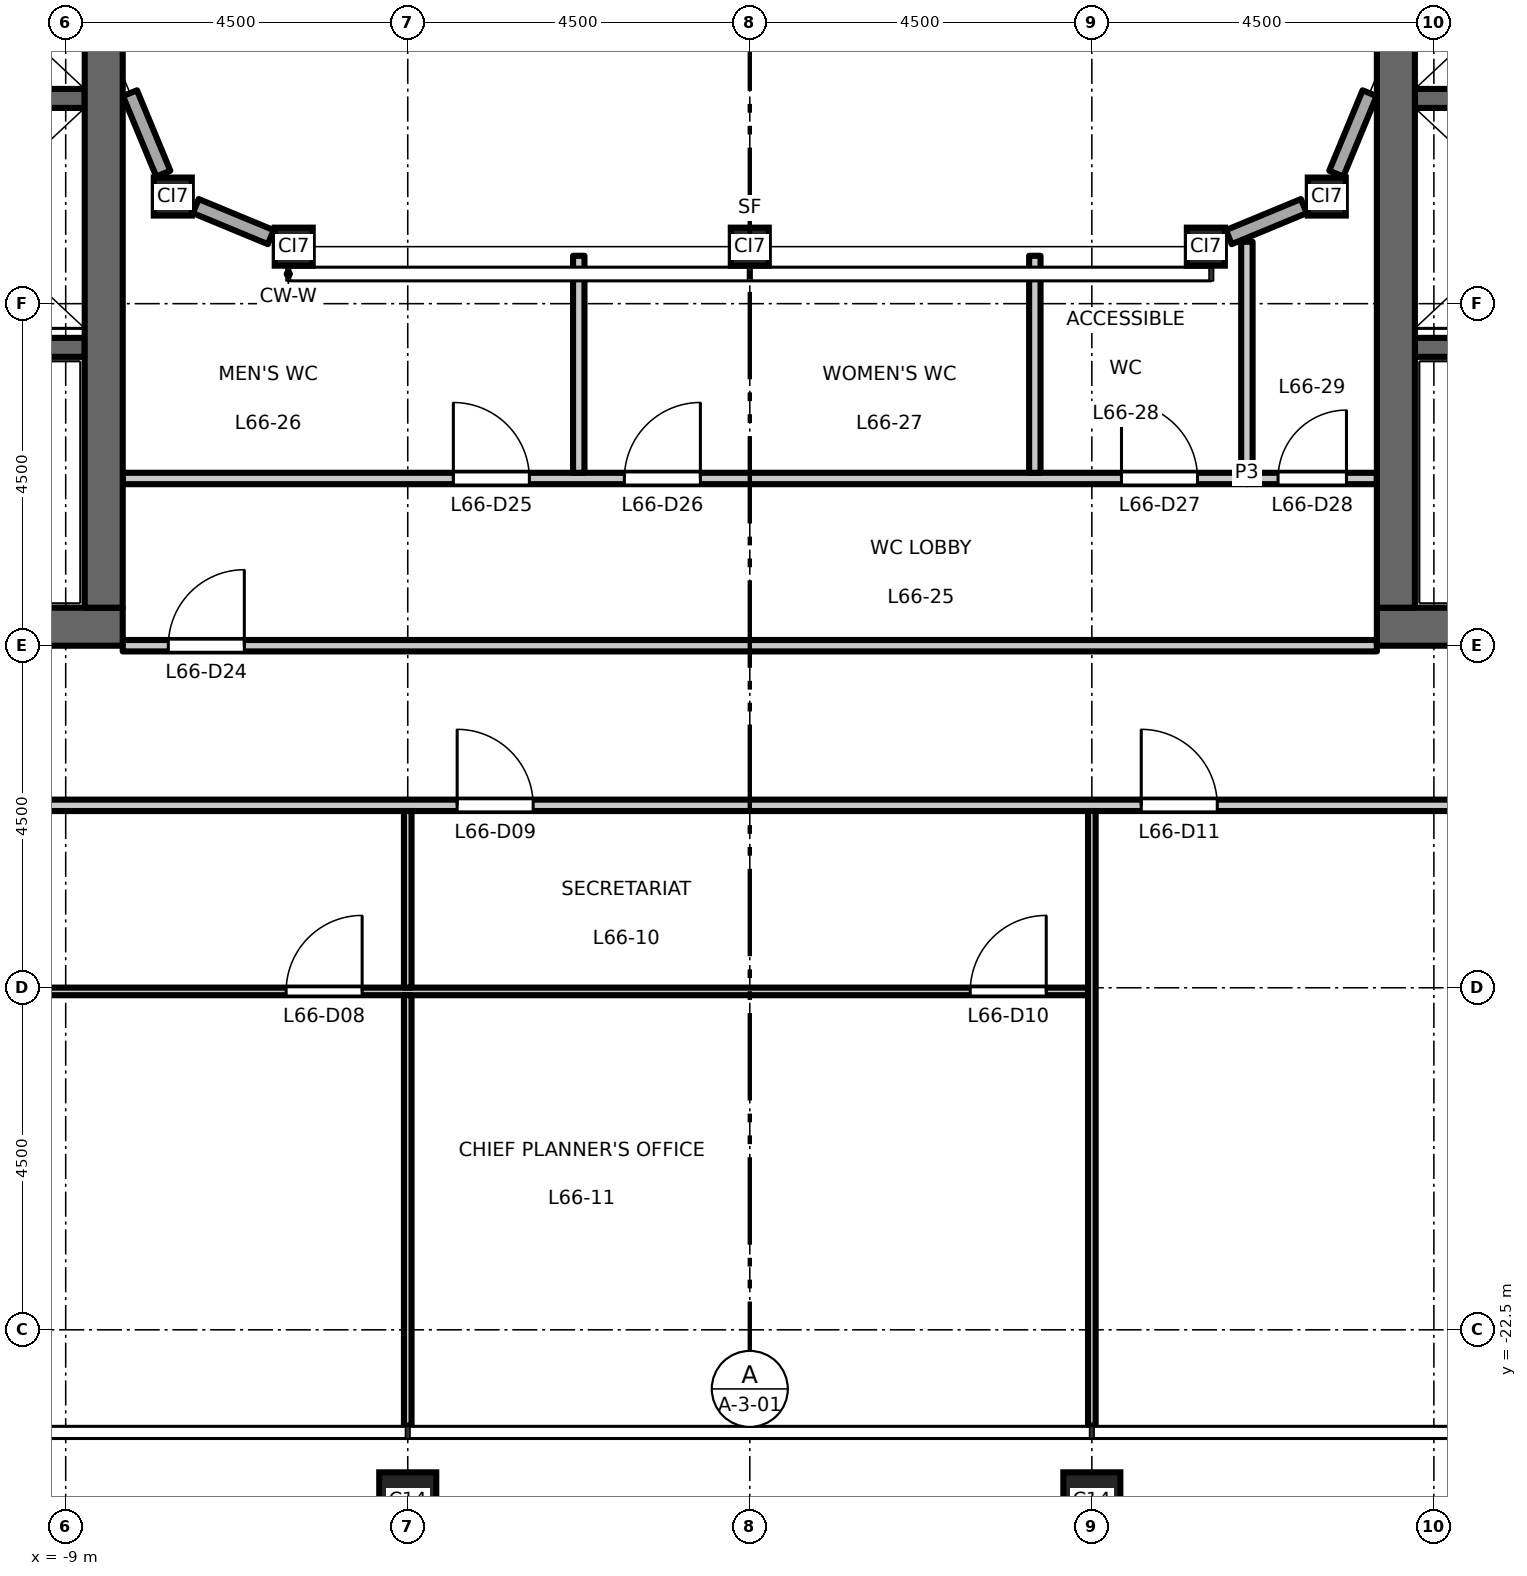
"""IFC4 building model, lengths in metres.
Left out: names, types, materials, properties, quantities, classifications, styles, units other than length and angle.
Written with IfcOpenShell. Run it as: python <this file> out.ifc"""

import sys

from ifc_helpers import new_model, si_unit, direction, frame, frame_2d, origin, origin_2d, place, context, subcontext, project, spatial, rectangle, hollow_rectangle, extrude, element, fill, save


model = new_model("IFC4")
c1 = context("Model", 3, precision=1e-05, world=origin(), true_north=direction((0.0, 1.0)))
c2 = subcontext(c1, "Body", "Model", "MODEL_VIEW")
j1 = project(units=[si_unit("LENGTHUNIT", "METRE"), si_unit("PLANEANGLEUNIT", "RADIAN")], contexts=[c1])
p1 = place(None, origin())
s1 = spatial("IfcSite", under=j1, at=p1, CompositionType="ELEMENT")
p2 = place(p1, origin())
s2 = spatial("IfcBuilding", under=s1, at=p2, CompositionType="ELEMENT")
p3 = place(p2, frame((0.0, 0.0, 307.7)))
s3 = spatial("IfcBuildingStorey", under=s2, at=p3, CompositionType="ELEMENT", Elevation=307.7)
for number, where, z_axis, x_axis in (
    (1, (-4.5, -24.75, 0.0), (0.0, 0.0, 1.0), (1.0, 0.0, 0.0)),
    (2, (4.5, -24.75, 0.0), (0.0, 0.0, 1.0), (1.0, 0.0, 0.0)),
):
    element("IfcColumn", number, at=place(p3, frame(where, z_axis=z_axis, x_axis=x_axis)), inside=s3, PredefinedType="COLUMN", context=c2, shape_type="SweptSolid", body=[
        extrude(hollow_rectangle(XDim=0.75, YDim=0.75, WallThickness=0.04, at=origin_2d()), origin(), (0.0, 0.0, 1.0), 4.5),
    ])
for number, where, z_axis, x_axis in (
    (3, (-7.591, -7.591, 0.0), (0.0, 0.0, 1.0), (1.0, 0.0, 0.0)),
    (4, (-6.0, -8.25, 0.0), (0.0, 0.0, 1.0), (1.0, 0.0, 0.0)),
    (5, (0.0, -8.25, 0.0), (0.0, 0.0, 1.0), (1.0, 0.0, 0.0)),
    (6, (6.0, -8.25, 0.0), (0.0, 0.0, 1.0), (1.0, 0.0, 0.0)),
    (7, (7.591, -7.591, 0.0), (0.0, 0.0, 1.0), (1.0, 0.0, 0.0)),
):
    element("IfcColumn", number, at=place(p3, frame(where, z_axis=z_axis, x_axis=x_axis)), inside=s3, PredefinedType="COLUMN", context=c2, shape_type="SweptSolid", body=[
        extrude(hollow_rectangle(XDim=0.5, YDim=0.5, WallThickness=0.025, at=origin_2d()), origin(), (0.0, 0.0, 1.0), 4.5),
    ])
p4 = place(p3, frame((-8.75, -6.3, 0.0), z_axis=(0.0, 0.0, 1.0), x_axis=(-1.0, 0.0, 0.0)))
e8 = element("IfcWall", 8, at=p4, inside=s3, PredefinedType="SHEAR", context=c2, shape_type="SweptSolid", body=[
    extrude(rectangle(XDim=3.1, YDim=0.25, at=frame_2d((1.55, 0.0))), origin(), (0.0, 0.0, 1.0), 4.35),
])
p5 = place(p3, frame((-8.75, -9.575, 0.0), z_axis=(0.0, 0.0, 1.0), x_axis=(-1.0, 0.0, 0.0)))
e9 = element("IfcWall", 9, at=p5, inside=s3, PredefinedType="SHEAR", context=c2, shape_type="SweptSolid", body=[
    extrude(rectangle(XDim=8.0, YDim=0.25, at=frame_2d((4.0, 0.0))), origin(), (0.0, 0.0, 1.0), 4.35),
])
p6 = place(p5, frame((6.65, 0.0, 0.0)))
e10 = element("IfcOpeningElement", 10, at=p6, cuts=e9, PredefinedType="OPENING", context=c2, shape_type="SweptSolid", body=[
    extrude(rectangle(XDim=1.1, YDim=2.1, at=frame_2d((0.55, 1.05))), frame((0.0, 0.135, 0.0), z_axis=(0.0, -1.0, 0.0), x_axis=(1.0, 0.0, 0.0)), (0.0, 0.0, 1.0), 0.27),
])
p7 = place(p3, frame((-8.25, -13.25, 0.0), z_axis=(0.0, 0.0, 1.0), x_axis=(-1.0, 0.0, 0.0)))
e11 = element("IfcWall", 11, at=p7, inside=s3, PredefinedType="SHEAR", context=c2, shape_type="SweptSolid", body=[
    extrude(rectangle(XDim=9.0, YDim=0.5, at=frame_2d((4.5, 0.0))), origin(), (0.0, 0.0, 1.0), 4.35),
])
p8 = place(p3, frame((-8.5, -13.0, 0.0), z_axis=(0.0, 0.0, 1.0), x_axis=(0.0, 1.0, 0.0)))
e12 = element("IfcWall", 12, at=p8, inside=s3, PredefinedType="SHEAR", context=c2, shape_type="SweptSolid", body=[
    extrude(rectangle(XDim=26.0, YDim=0.5, at=frame_2d((13.0, 0.0))), origin(), (0.0, 0.0, 1.0), 4.35),
])
p9 = place(p3, frame((8.75, -6.3, 0.0), z_axis=(0.0, 0.0, 1.0), x_axis=(1.0, 0.0, 0.0)))
e13 = element("IfcWall", 13, at=p9, inside=s3, PredefinedType="SHEAR", context=c2, shape_type="SweptSolid", body=[
    extrude(rectangle(XDim=3.1, YDim=0.25, at=frame_2d((1.55, 0.0))), origin(), (0.0, 0.0, 1.0), 4.35),
])
p10 = place(p3, frame((8.75, -9.575, 0.0), z_axis=(0.0, 0.0, 1.0), x_axis=(1.0, 0.0, 0.0)))
e14 = element("IfcWall", 14, at=p10, inside=s3, PredefinedType="SHEAR", context=c2, shape_type="SweptSolid", body=[
    extrude(rectangle(XDim=8.0, YDim=0.25, at=frame_2d((4.0, 0.0))), origin(), (0.0, 0.0, 1.0), 4.35),
])
p11 = place(p10, frame((6.65, 0.0, 0.0)))
e15 = element("IfcOpeningElement", 15, at=p11, cuts=e14, PredefinedType="OPENING", context=c2, shape_type="SweptSolid", body=[
    extrude(rectangle(XDim=1.1, YDim=2.1, at=frame_2d((0.55, 1.05))), frame((0.0, 0.135, 0.0), z_axis=(0.0, -1.0, 0.0), x_axis=(1.0, 0.0, 0.0)), (0.0, 0.0, 1.0), 0.27),
])
p12 = place(p3, frame((8.25, -13.25, 0.0), z_axis=(0.0, 0.0, 1.0), x_axis=(1.0, 0.0, 0.0)))
e16 = element("IfcWall", 16, at=p12, inside=s3, PredefinedType="SHEAR", context=c2, shape_type="SweptSolid", body=[
    extrude(rectangle(XDim=9.0, YDim=0.5, at=frame_2d((4.5, 0.0))), origin(), (0.0, 0.0, 1.0), 4.35),
])
p13 = place(p3, frame((8.5, -13.0, 0.0), z_axis=(0.0, 0.0, 1.0), x_axis=(0.0, 1.0, 0.0)))
e17 = element("IfcWall", 17, at=p13, inside=s3, PredefinedType="SHEAR", context=c2, shape_type="SweptSolid", body=[
    extrude(rectangle(XDim=26.0, YDim=0.5, at=frame_2d((13.0, 0.0))), origin(), (0.0, 0.0, 1.0), 4.35),
])
p14 = place(p3, frame((6.302, -8.125, 0.0), z_axis=(0.0, 0.0, 1.0), x_axis=(0.923919409248, 0.382587147216, 0.0)))
e18 = element("IfcWall", 18, at=p14, inside=s3, PredefinedType="STANDARD", context=c2, shape_type="SweptSolid", body=[
    extrude(rectangle(XDim=1.069, YDim=0.2, at=frame_2d((0.534, 0.0))), origin(), (0.0, 0.0, 1.0), 4.01),
])
for number, where, z_axis, x_axis in (
    (19, (7.716, -7.289, 0.0), (0.0, 0.0, 1.0), (0.383, 0.924, 0.0)),
    (20, (-8.154, -6.231, 0.0), (0.0, 0.0, 1.0), (0.383, -0.924, 0.0)),
):
    element("IfcWall", number, at=place(p3, frame(where, z_axis=z_axis, x_axis=x_axis)), inside=s3, PredefinedType="STANDARD", context=c2, shape_type="SweptSolid", body=[
        extrude(rectangle(XDim=1.146, YDim=0.2, at=frame_2d((0.573, 0.0))), origin(), (0.0, 0.0, 1.0), 4.01),
    ])
p15 = place(p3, frame((-7.289, -7.716, 0.0), z_axis=(0.0, 0.0, 1.0), x_axis=(0.923919409248, -0.382587147216, 0.0)))
e21 = element("IfcWall", 21, at=p15, inside=s3, PredefinedType="STANDARD", context=c2, shape_type="SweptSolid", body=[
    extrude(rectangle(XDim=1.069, YDim=0.2, at=frame_2d((0.534, 0.0))), origin(), (0.0, 0.0, 1.0), 4.01),
])
p16 = place(p3, frame((-13.45, -18.048, 0.0), z_axis=(0.0, 0.0, 1.0), x_axis=(1.0, 0.0, 0.0)))
e22 = element("IfcWall", 22, at=p16, inside=s3, PredefinedType="PARTITIONING", context=c2, shape_type="SweptSolid", body=[
    extrude(rectangle(XDim=17.9, YDim=0.1, at=frame_2d((8.95, 0.0))), origin(), (0.0, 0.0, 1.0), 3.99),
])
p17 = place(p16, frame((7.35, 0.0, 0.0)))
e23 = element("IfcOpeningElement", 23, at=p17, cuts=e22, PredefinedType="OPENING", context=c2, shape_type="SweptSolid", body=[
    extrude(rectangle(XDim=1.0, YDim=2.1, at=frame_2d((0.5, 1.05))), frame((0.0, 0.06, 0.0), z_axis=(0.0, -1.0, 0.0), x_axis=(1.0, 0.0, 0.0)), (0.0, 0.0, 1.0), 0.12),
])
p18 = place(p16, frame((16.35, 0.0, 0.0)))
e24 = element("IfcOpeningElement", 24, at=p18, cuts=e22, PredefinedType="OPENING", context=c2, shape_type="SweptSolid", body=[
    extrude(rectangle(XDim=1.0, YDim=2.1, at=frame_2d((0.5, 1.05))), frame((0.0, 0.06, 0.0), z_axis=(0.0, -1.0, 0.0), x_axis=(1.0, 0.0, 0.0)), (0.0, 0.0, 1.0), 0.12),
])
p19 = place(p3, frame((-19.425, -15.6, 0.0), z_axis=(0.0, 0.0, 1.0), x_axis=(1.0, 0.0, 0.0)))
e25 = element("IfcWall", 25, at=p19, inside=s3, PredefinedType="PARTITIONING", context=c2, shape_type="SweptSolid", body=[
    extrude(rectangle(XDim=38.85, YDim=0.15, at=frame_2d((19.425, 0.0))), origin(), (0.0, 0.0, 1.0), 4.35),
])
p20 = place(p19, frame((6.575, 0.0, 0.0)))
e26 = element("IfcOpeningElement", 26, at=p20, cuts=e25, PredefinedType="OPENING", context=c2, shape_type="SweptSolid", body=[
    extrude(rectangle(XDim=1.0, YDim=2.1, at=frame_2d((0.5, 1.05))), frame((0.0, 0.085, 0.0), z_axis=(0.0, -1.0, 0.0), x_axis=(1.0, 0.0, 0.0)), (0.0, 0.0, 1.0), 0.17),
])
p21 = place(p19, frame((15.575, 0.0, 0.0)))
e27 = element("IfcOpeningElement", 27, at=p21, cuts=e25, PredefinedType="OPENING", context=c2, shape_type="SweptSolid", body=[
    extrude(rectangle(XDim=1.0, YDim=2.1, at=frame_2d((0.5, 1.05))), frame((0.0, 0.085, 0.0), z_axis=(0.0, -1.0, 0.0), x_axis=(1.0, 0.0, 0.0)), (0.0, 0.0, 1.0), 0.17),
])
p22 = place(p19, frame((24.575, 0.0, 0.0)))
e28 = element("IfcOpeningElement", 28, at=p22, cuts=e25, PredefinedType="OPENING", context=c2, shape_type="SweptSolid", body=[
    extrude(rectangle(XDim=1.0, YDim=2.1, at=frame_2d((0.5, 1.05))), frame((0.0, 0.085, 0.0), z_axis=(0.0, -1.0, 0.0), x_axis=(1.0, 0.0, 0.0)), (0.0, 0.0, 1.0), 0.17),
])
p23 = place(p19, frame((0.725, 0.0, 0.0)))
e29 = element("IfcOpeningElement", 29, at=p23, cuts=e25, PredefinedType="OPENING", context=c2, shape_type="SweptSolid", body=[
    extrude(rectangle(XDim=1.0, YDim=2.1, at=frame_2d((0.5, 1.05))), frame((0.0, 0.085, 0.0), z_axis=(0.0, -1.0, 0.0), x_axis=(1.0, 0.0, 0.0)), (0.0, 0.0, 1.0), 0.17),
])
p24 = place(p19, frame((37.075, 0.0, 0.0)))
e30 = element("IfcOpeningElement", 30, at=p24, cuts=e25, PredefinedType="OPENING", context=c2, shape_type="SweptSolid", body=[
    extrude(rectangle(XDim=1.0, YDim=2.1, at=frame_2d((0.5, 1.05))), frame((0.0, 0.085, 0.0), z_axis=(0.0, -1.0, 0.0), x_axis=(1.0, 0.0, 0.0)), (0.0, 0.0, 1.0), 0.17),
])
p25 = place(p3, frame((-8.25, -13.5, 0.0), z_axis=(0.0, 0.0, 1.0), x_axis=(1.0, 0.0, 0.0)))
e31 = element("IfcWall", 31, at=p25, inside=s3, PredefinedType="PARTITIONING", context=c2, shape_type="SweptSolid", body=[
    extrude(rectangle(XDim=16.5, YDim=0.15, at=frame_2d((8.25, 0.0))), origin(), (0.0, 0.0, 1.0), 4.35),
])
p26 = place(p25, frame((0.6, 0.0, 0.0)))
e32 = element("IfcOpeningElement", 32, at=p26, cuts=e31, PredefinedType="OPENING", context=c2, shape_type="SweptSolid", body=[
    extrude(rectangle(XDim=1.0, YDim=2.1, at=frame_2d((0.5, 1.05))), frame((0.0, 0.085, 0.0), z_axis=(0.0, -1.0, 0.0), x_axis=(1.0, 0.0, 0.0)), (0.0, 0.0, 1.0), 0.17),
])
p27 = place(p3, frame((-8.25, -11.3, 0.0), z_axis=(0.0, 0.0, 1.0), x_axis=(1.0, 0.0, 0.0)))
e33 = element("IfcWall", 33, at=p27, inside=s3, PredefinedType="PARTITIONING", context=c2, shape_type="SweptSolid", body=[
    extrude(rectangle(XDim=14.79, YDim=0.15, at=frame_2d((7.395, 0.0))), origin(), (0.0, 0.0, 1.0), 4.35),
])
p28 = place(p27, frame((4.35, 0.0, 0.0)))
e34 = element("IfcOpeningElement", 34, at=p28, cuts=e33, PredefinedType="OPENING", context=c2, shape_type="SweptSolid", body=[
    extrude(rectangle(XDim=1.0, YDim=2.1, at=frame_2d((0.5, 1.05))), frame((0.0, 0.085, 0.0), z_axis=(0.0, -1.0, 0.0), x_axis=(1.0, 0.0, 0.0)), (0.0, 0.0, 1.0), 0.17),
])
p29 = place(p27, frame((6.6, 0.0, 0.0)))
e35 = element("IfcOpeningElement", 35, at=p29, cuts=e33, PredefinedType="OPENING", context=c2, shape_type="SweptSolid", body=[
    extrude(rectangle(XDim=1.0, YDim=2.1, at=frame_2d((0.5, 1.05))), frame((0.0, 0.085, 0.0), z_axis=(0.0, -1.0, 0.0), x_axis=(1.0, 0.0, 0.0)), (0.0, 0.0, 1.0), 0.17),
])
p30 = place(p27, frame((13.14, 0.0, 0.0)))
e36 = element("IfcOpeningElement", 36, at=p30, cuts=e33, PredefinedType="OPENING", context=c2, shape_type="SweptSolid", body=[
    extrude(rectangle(XDim=1.0, YDim=2.1, at=frame_2d((0.5, 1.05))), frame((0.0, 0.085, 0.0), z_axis=(0.0, -1.0, 0.0), x_axis=(1.0, 0.0, 0.0)), (0.0, 0.0, 1.0), 0.17),
])
p31 = place(p3, frame((6.54, -11.3, 0.0), z_axis=(0.0, 0.0, 1.0), x_axis=(1.0, 0.0, 0.0)))
e37 = element("IfcWall", 37, at=p31, inside=s3, PredefinedType="PARTITIONING", context=c2, shape_type="SweptSolid", body=[
    extrude(rectangle(XDim=1.71, YDim=0.15, at=frame_2d((0.855, 0.0))), origin(), (0.0, 0.0, 1.0), 4.35),
])
p32 = place(p31, frame((0.41, 0.0, 0.0)))
e38 = element("IfcOpeningElement", 38, at=p32, cuts=e37, PredefinedType="OPENING", context=c2, shape_type="SweptSolid", body=[
    extrude(rectangle(XDim=0.9, YDim=2.1, at=frame_2d((0.45, 1.05))), frame((0.0, 0.085, 0.0), z_axis=(0.0, -1.0, 0.0), x_axis=(1.0, 0.0, 0.0)), (0.0, 0.0, 1.0), 0.17),
])
p33 = place(p3, frame((-4.5, -23.76, 0.0), z_axis=(0.0, 0.0, 1.0), x_axis=(0.0, 1.0, 0.0)))
e39 = element("IfcWall", 39, at=p33, inside=s3, PredefinedType="PARTITIONING", context=c2, shape_type="SweptSolid", body=[
    extrude(rectangle(XDim=5.662, YDim=0.1, at=frame_2d((2.831, 0.0))), origin(), (0.0, 0.0, 1.0), 3.65),
])
p34 = place(p3, frame((-4.5, -17.998, 0.0), z_axis=(0.0, 0.0, 1.0), x_axis=(0.0, 1.0, 0.0)))
e40 = element("IfcWall", 40, at=p34, inside=s3, PredefinedType="PARTITIONING", context=c2, shape_type="SweptSolid", body=[
    extrude(rectangle(XDim=2.323, YDim=0.1, at=frame_2d((1.162, 0.0))), origin(), (0.0, 0.0, 1.0), 3.65),
])
for number, where, z_axis, x_axis in (
    (41, (-2.25, -11.225, 0.0), (0.0, 0.0, 1.0), (0.0, 1.0, 0.0)),
    (42, (3.75, -11.225, 0.0), (0.0, 0.0, 1.0), (0.0, 1.0, 0.0)),
):
    element("IfcWall", number, at=place(p3, frame(where, z_axis=z_axis, x_axis=x_axis)), inside=s3, PredefinedType="PARTITIONING", context=c2, shape_type="SweptSolid", body=[
        extrude(rectangle(XDim=2.855, YDim=0.15, at=frame_2d((1.427, 0.0))), origin(), (0.0, 0.0, 1.0), 4.35),
    ])
p35 = place(p3, frame((4.5, -23.76, 0.0), z_axis=(0.0, 0.0, 1.0), x_axis=(0.0, 1.0, 0.0)))
e43 = element("IfcWall", 43, at=p35, inside=s3, PredefinedType="PARTITIONING", context=c2, shape_type="SweptSolid", body=[
    extrude(rectangle(XDim=8.085, YDim=0.1, at=frame_2d((4.042, 0.0))), origin(), (0.0, 0.0, 1.0), 3.65),
])
p36 = place(p3, frame((6.54, -11.225, 0.0), z_axis=(0.0, 0.0, 1.0), x_axis=(0.0, 1.0, 0.0)))
e44 = element("IfcWall", 44, at=p36, inside=s3, PredefinedType="PARTITIONING", context=c2, shape_type="SweptSolid", body=[
    extrude(rectangle(XDim=3.039, YDim=0.15, at=frame_2d((1.52, 0.0))), origin(), (0.0, 0.0, 1.0), 4.35),
])
p37 = place(p17, origin())
e45 = element("IfcDoor", 45, at=p37, inside=s3, OperationType="SINGLE_SWING_RIGHT", PredefinedType="DOOR", context=c2, shape_type="SweptSolid", body=[
    extrude(rectangle(XDim=1.0, YDim=2.1, at=frame_2d((0.5, 1.05))), frame((0.0, 0.025, 0.0), z_axis=(0.0, -1.0, 0.0), x_axis=(1.0, 0.0, 0.0)), (0.0, 0.0, 1.0), 0.05),
])
fill(e23, e45)
p38 = place(p21, origin())
e46 = element("IfcDoor", 46, at=p38, inside=s3, OperationType="SINGLE_SWING_LEFT", PredefinedType="DOOR", context=c2, shape_type="SweptSolid", body=[
    extrude(rectangle(XDim=1.0, YDim=2.1, at=frame_2d((0.5, 1.05))), frame((0.0, 0.025, 0.0), z_axis=(0.0, -1.0, 0.0), x_axis=(1.0, 0.0, 0.0)), (0.0, 0.0, 1.0), 0.05),
])
fill(e27, e46)
p39 = place(p18, origin())
e47 = element("IfcDoor", 47, at=p39, inside=s3, OperationType="SINGLE_SWING_RIGHT", PredefinedType="DOOR", context=c2, shape_type="SweptSolid", body=[
    extrude(rectangle(XDim=1.0, YDim=2.1, at=frame_2d((0.5, 1.05))), frame((0.0, 0.025, 0.0), z_axis=(0.0, -1.0, 0.0), x_axis=(1.0, 0.0, 0.0)), (0.0, 0.0, 1.0), 0.05),
])
fill(e24, e47)
p40 = place(p22, origin())
e48 = element("IfcDoor", 48, at=p40, inside=s3, OperationType="SINGLE_SWING_LEFT", PredefinedType="DOOR", context=c2, shape_type="SweptSolid", body=[
    extrude(rectangle(XDim=1.0, YDim=2.1, at=frame_2d((0.5, 1.05))), frame((0.0, 0.025, 0.0), z_axis=(0.0, -1.0, 0.0), x_axis=(1.0, 0.0, 0.0)), (0.0, 0.0, 1.0), 0.05),
])
fill(e28, e48)
p41 = place(p26, origin())
e49 = element("IfcDoor", 49, at=p41, inside=s3, OperationType="SINGLE_SWING_RIGHT", PredefinedType="DOOR", context=c2, shape_type="SweptSolid", body=[
    extrude(rectangle(XDim=1.0, YDim=2.1, at=frame_2d((0.5, 1.05))), frame((0.0, 0.025, 0.0), z_axis=(0.0, -1.0, 0.0), x_axis=(1.0, 0.0, 0.0)), (0.0, 0.0, 1.0), 0.05),
])
fill(e32, e49)
p42 = place(p28, origin())
e50 = element("IfcDoor", 50, at=p42, inside=s3, OperationType="SINGLE_SWING_LEFT", PredefinedType="DOOR", context=c2, shape_type="SweptSolid", body=[
    extrude(rectangle(XDim=1.0, YDim=2.1, at=frame_2d((0.5, 1.05))), frame((0.0, 0.025, 0.0), z_axis=(0.0, -1.0, 0.0), x_axis=(1.0, 0.0, 0.0)), (0.0, 0.0, 1.0), 0.05),
])
fill(e34, e50)
p43 = place(p29, origin())
e51 = element("IfcDoor", 51, at=p43, inside=s3, OperationType="SINGLE_SWING_RIGHT", PredefinedType="DOOR", context=c2, shape_type="SweptSolid", body=[
    extrude(rectangle(XDim=1.0, YDim=2.1, at=frame_2d((0.5, 1.05))), frame((0.0, 0.025, 0.0), z_axis=(0.0, -1.0, 0.0), x_axis=(1.0, 0.0, 0.0)), (0.0, 0.0, 1.0), 0.05),
])
fill(e35, e51)
p44 = place(p30, origin())
e52 = element("IfcDoor", 52, at=p44, inside=s3, OperationType="SINGLE_SWING_LEFT", PredefinedType="DOOR", context=c2, shape_type="SweptSolid", body=[
    extrude(rectangle(XDim=1.0, YDim=2.1, at=frame_2d((0.5, 1.05))), frame((0.0, 0.025, 0.0), z_axis=(0.0, -1.0, 0.0), x_axis=(1.0, 0.0, 0.0)), (0.0, 0.0, 1.0), 0.05),
])
fill(e36, e52)
p45 = place(p32, origin())
e53 = element("IfcDoor", 53, at=p45, inside=s3, OperationType="SINGLE_SWING_RIGHT", PredefinedType="DOOR", context=c2, shape_type="SweptSolid", body=[
    extrude(rectangle(XDim=0.9, YDim=2.1, at=frame_2d((0.45, 1.05))), frame((0.0, 0.025, 0.0), z_axis=(0.0, -1.0, 0.0), x_axis=(1.0, 0.0, 0.0)), (0.0, 0.0, 1.0), 0.05),
])
fill(e38, e53)
save(model, sys.argv[1])
